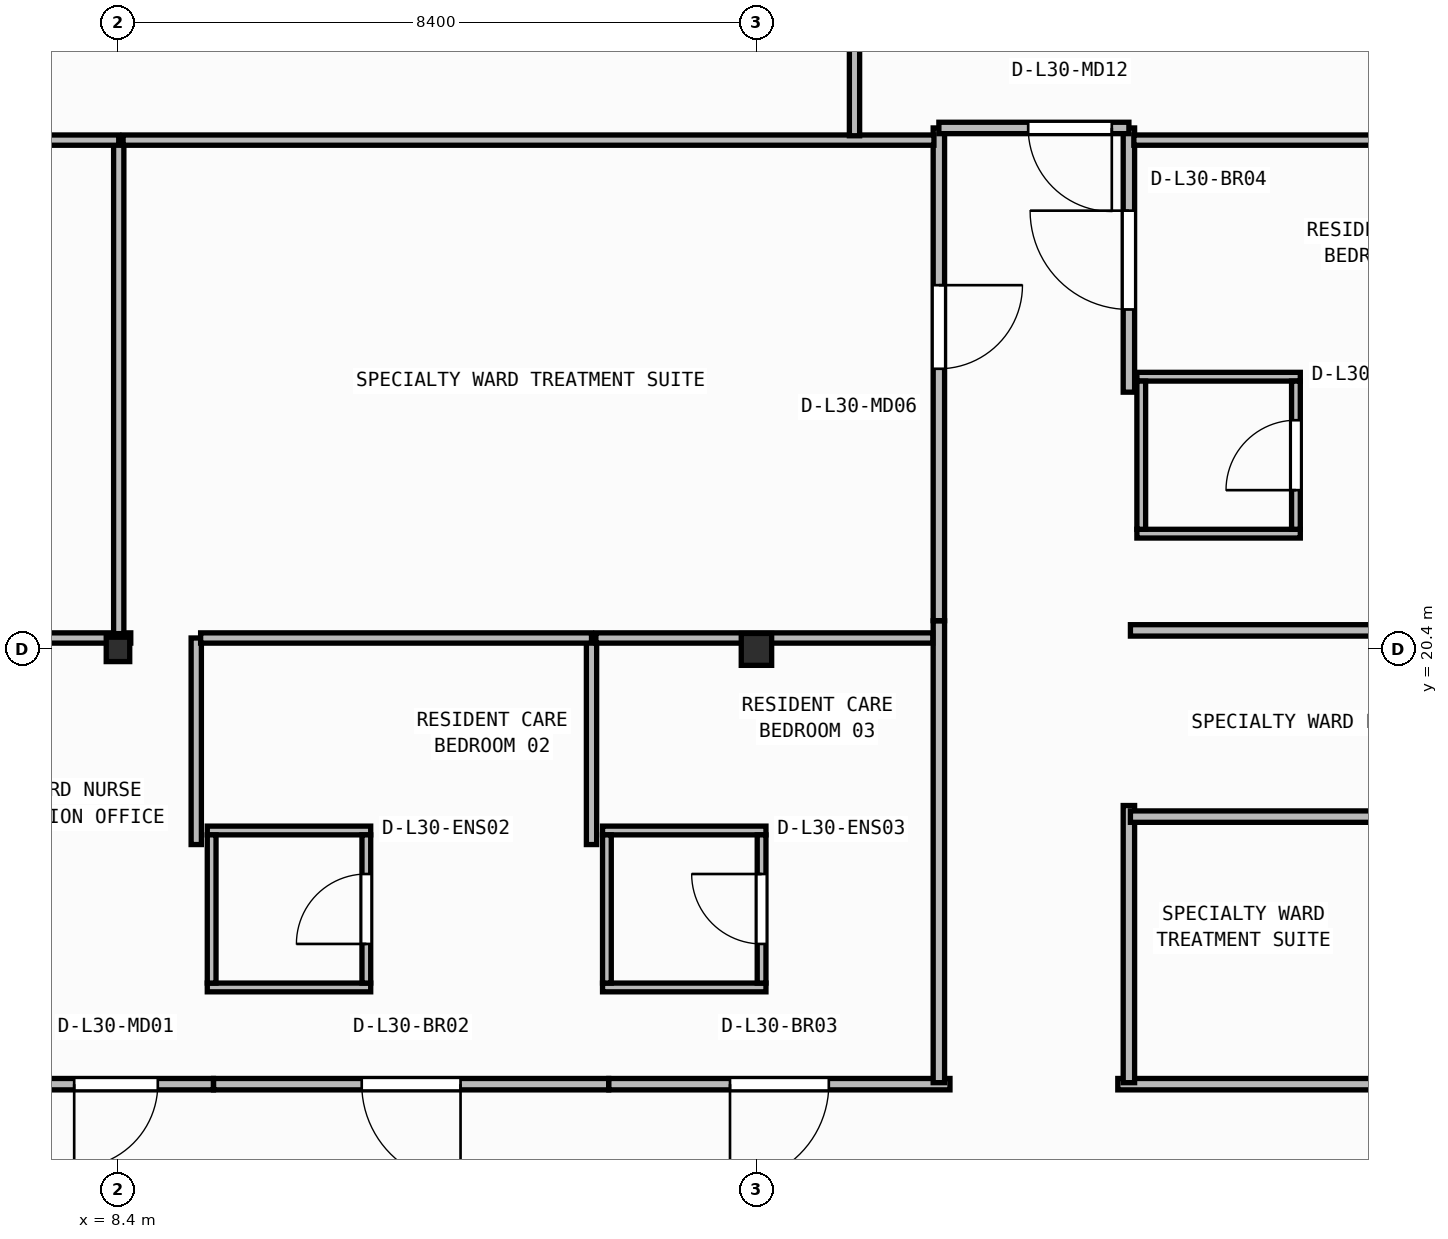
"""IFC4 building model, lengths in metres.
Left out: names, types, materials, properties, quantities, classifications, styles, units other than length and angle.
Written with IfcOpenShell. Run it as: python <this file> out.ifc"""

import sys

from ifc_helpers import new_model, si_unit, direction, frame, frame_2d, origin, origin_2d, place, context, subcontext, project, spatial, rectangle, i_section, extrude, element, fill, save


model = new_model("IFC4")
c1 = context("Model", 3, precision=1e-05, world=origin(), true_north=direction((0.0, 1.0)))
c2 = subcontext(c1, "Body", "Model", "MODEL_VIEW")
j1 = project(units=[si_unit("LENGTHUNIT", "METRE"), si_unit("PLANEANGLEUNIT", "RADIAN")], contexts=[c1])
p1 = place(None, origin())
s1 = spatial("IfcSite", under=j1, at=p1, CompositionType="ELEMENT")
p2 = place(p1, origin())
s2 = spatial("IfcBuilding", under=s1, at=p2, CompositionType="ELEMENT")
p3 = place(p2, frame((0.0, 0.0, 123.1)))
s3 = spatial("IfcBuildingStorey", under=s2, at=p3, CompositionType="ELEMENT", Elevation=123.1)
p4 = place(p3, frame((8.4, 20.4, 0.0), z_axis=(0.0, 0.0, 1.0), x_axis=(1.0, 0.0, 0.0)))
e1 = element("IfcColumn", 1, at=p4, inside=s3, PredefinedType="COLUMN", context=c2, shape_type="SweptSolid", body=[
    extrude(i_section(OverallWidth=0.309, OverallDepth=0.321, WebThickness=0.014, FlangeThickness=0.022, FilletRadius=0.017, at=origin_2d()), origin(), (0.0, 0.0, 1.0), 3.95),
])
p5 = place(p3, frame((16.8, 20.4, 0.0), z_axis=(0.0, 0.0, 1.0), x_axis=(1.0, 0.0, 0.0)))
e2 = element("IfcColumn", 2, at=p5, inside=s3, PredefinedType="COLUMN", context=c2, shape_type="SweptSolid", body=[
    extrude(i_section(OverallWidth=0.4, OverallDepth=0.42, WebThickness=0.025, FlangeThickness=0.04, at=origin_2d()), origin(), (0.0, 0.0, 1.0), 3.95),
])
for number, where, z_axis, x_axis in (
    (3, (9.575, 15.952, 0.0), (0.0, 0.0, 1.0), (1.0, 0.0, 0.0)),
    (4, (9.575, 18.018, 0.0), (0.0, 0.0, 1.0), (1.0, 0.0, 0.0)),
):
    element("IfcWall", number, at=place(p3, frame(where, z_axis=z_axis, x_axis=x_axis)), inside=s3, PredefinedType="PARTITIONING", context=c2, shape_type="SweptSolid", body=[
        extrude(rectangle(XDim=2.15, YDim=0.115, at=frame_2d((1.075, 0.0))), origin(), (0.0, 0.0, 1.0), 3.71),
    ])
p6 = place(p3, frame((9.633, 16.01, 0.0), z_axis=(0.0, 0.0, 1.0), x_axis=(0.0, 1.0, 0.0)))
e5 = element("IfcWall", 5, at=p6, inside=s3, PredefinedType="PARTITIONING", context=c2, shape_type="SweptSolid", body=[
    extrude(rectangle(XDim=1.95, YDim=0.115, at=frame_2d((0.975, 0.0))), origin(), (0.0, 0.0, 1.0), 3.71),
])
p7 = place(p3, frame((11.667, 16.01, 0.0), z_axis=(0.0, 0.0, 1.0), x_axis=(0.0, 1.0, 0.0)))
e6 = element("IfcWall", 6, at=p7, inside=s3, PredefinedType="PARTITIONING", context=c2, shape_type="SweptSolid", body=[
    extrude(rectangle(XDim=1.95, YDim=0.115, at=frame_2d((0.975, 0.0))), origin(), (0.0, 0.0, 1.0), 3.71),
])
p8 = place(p7, frame((0.515, 0.0, 0.0)))
e7 = element("IfcOpeningElement", 7, at=p8, cuts=e6, PredefinedType="OPENING", context=c2, shape_type="SweptSolid", body=[
    extrude(rectangle(XDim=0.92, YDim=2.1, at=frame_2d((0.46, 1.05))), frame((0.0, 0.067, 0.0), z_axis=(0.0, -1.0, 0.0), x_axis=(1.0, 0.0, 0.0)), (0.0, 0.0, 1.0), 0.135),
])
for number, where, z_axis, x_axis in (
    (8, (14.775, 15.952, 0.0), (0.0, 0.0, 1.0), (1.0, 0.0, 0.0)),
    (9, (14.775, 18.018, 0.0), (0.0, 0.0, 1.0), (1.0, 0.0, 0.0)),
):
    element("IfcWall", number, at=place(p3, frame(where, z_axis=z_axis, x_axis=x_axis)), inside=s3, PredefinedType="PARTITIONING", context=c2, shape_type="SweptSolid", body=[
        extrude(rectangle(XDim=2.15, YDim=0.115, at=frame_2d((1.075, 0.0))), origin(), (0.0, 0.0, 1.0), 3.71),
    ])
p9 = place(p3, frame((14.833, 16.01, 0.0), z_axis=(0.0, 0.0, 1.0), x_axis=(0.0, 1.0, 0.0)))
e10 = element("IfcWall", 10, at=p9, inside=s3, PredefinedType="PARTITIONING", context=c2, shape_type="SweptSolid", body=[
    extrude(rectangle(XDim=1.95, YDim=0.115, at=frame_2d((0.975, 0.0))), origin(), (0.0, 0.0, 1.0), 3.71),
])
p10 = place(p3, frame((16.867, 16.01, 0.0), z_axis=(0.0, 0.0, 1.0), x_axis=(0.0, 1.0, 0.0)))
e11 = element("IfcWall", 11, at=p10, inside=s3, PredefinedType="PARTITIONING", context=c2, shape_type="SweptSolid", body=[
    extrude(rectangle(XDim=1.95, YDim=0.115, at=frame_2d((0.975, 0.0))), origin(), (0.0, 0.0, 1.0), 3.71),
])
p11 = place(p10, frame((0.515, 0.0, 0.0)))
e12 = element("IfcOpeningElement", 12, at=p11, cuts=e11, PredefinedType="OPENING", context=c2, shape_type="SweptSolid", body=[
    extrude(rectangle(XDim=0.92, YDim=2.1, at=frame_2d((0.46, 1.05))), frame((0.0, 0.067, 0.0), z_axis=(0.0, -1.0, 0.0), x_axis=(1.0, 0.0, 0.0)), (0.0, 0.0, 1.0), 0.135),
])
for number, where, z_axis, x_axis in (
    (13, (21.805, 21.923, 0.0), (0.0, 0.0, 1.0), (1.0, 0.0, 0.0)),
    (14, (21.805, 23.988, 0.0), (0.0, 0.0, 1.0), (1.0, 0.0, 0.0)),
):
    element("IfcWall", number, at=place(p3, frame(where, z_axis=z_axis, x_axis=x_axis)), inside=s3, PredefinedType="PARTITIONING", context=c2, shape_type="SweptSolid", body=[
        extrude(rectangle(XDim=2.15, YDim=0.115, at=frame_2d((1.075, 0.0))), origin(), (0.0, 0.0, 1.0), 3.71),
    ])
p12 = place(p3, frame((21.863, 21.98, 0.0), z_axis=(0.0, 0.0, 1.0), x_axis=(0.0, 1.0, 0.0)))
e15 = element("IfcWall", 15, at=p12, inside=s3, PredefinedType="PARTITIONING", context=c2, shape_type="SweptSolid", body=[
    extrude(rectangle(XDim=1.95, YDim=0.115, at=frame_2d((0.975, 0.0))), origin(), (0.0, 0.0, 1.0), 3.71),
])
p13 = place(p3, frame((23.897, 21.98, 0.0), z_axis=(0.0, 0.0, 1.0), x_axis=(0.0, 1.0, 0.0)))
e16 = element("IfcWall", 16, at=p13, inside=s3, PredefinedType="PARTITIONING", context=c2, shape_type="SweptSolid", body=[
    extrude(rectangle(XDim=1.95, YDim=0.115, at=frame_2d((0.975, 0.0))), origin(), (0.0, 0.0, 1.0), 3.71),
])
p14 = place(p13, frame((0.515, 0.0, 0.0)))
e17 = element("IfcOpeningElement", 17, at=p14, cuts=e16, PredefinedType="OPENING", context=c2, shape_type="SweptSolid", body=[
    extrude(rectangle(XDim=0.92, YDim=2.1, at=frame_2d((0.46, 1.05))), frame((0.0, 0.067, 0.0), z_axis=(0.0, -1.0, 0.0), x_axis=(1.0, 0.0, 0.0)), (0.0, 0.0, 1.0), 0.135),
])
p15 = place(p3, frame((9.656, 14.68, 0.0), z_axis=(0.0, 0.0, 1.0), x_axis=(-1.0, 0.0, 0.0)))
e18 = element("IfcWall", 18, at=p15, inside=s3, PredefinedType="PARTITIONING", context=c2, shape_type="SweptSolid", body=[
    extrude(rectangle(XDim=2.564, YDim=0.15, at=frame_2d((1.282, 0.0))), origin(), (0.0, 0.0, 1.0), 3.71),
])
p16 = place(p15, frame((0.732, 0.0, 0.0)))
e19 = element("IfcOpeningElement", 19, at=p16, cuts=e18, PredefinedType="OPENING", context=c2, shape_type="SweptSolid", body=[
    extrude(rectangle(XDim=1.1, YDim=2.1, at=frame_2d((0.55, 1.05))), frame((0.0, 0.085, 0.0), z_axis=(0.0, -1.0, 0.0), x_axis=(1.0, 0.0, 0.0)), (0.0, 0.0, 1.0), 0.17),
])
p17 = place(p3, frame((14.856, 14.68, 0.0), z_axis=(0.0, 0.0, 1.0), x_axis=(-1.0, 0.0, 0.0)))
e20 = element("IfcWall", 20, at=p17, inside=s3, PredefinedType="PARTITIONING", context=c2, shape_type="SweptSolid", body=[
    extrude(rectangle(XDim=5.198, YDim=0.15, at=frame_2d((2.599, 0.0))), origin(), (0.0, 0.0, 1.0), 3.71),
])
p18 = place(p17, frame((1.949, 0.0, 0.0)))
e21 = element("IfcOpeningElement", 21, at=p18, cuts=e20, PredefinedType="OPENING", context=c2, shape_type="SweptSolid", body=[
    extrude(rectangle(XDim=1.3, YDim=2.15, at=frame_2d((0.65, 1.075))), frame((0.0, 0.085, 0.0), z_axis=(0.0, -1.0, 0.0), x_axis=(1.0, 0.0, 0.0)), (0.0, 0.0, 1.0), 0.17),
])
p19 = place(p3, frame((19.346, 14.68, 0.0), z_axis=(0.0, 0.0, 1.0), x_axis=(-1.0, 0.0, 0.0)))
e22 = element("IfcWall", 22, at=p19, inside=s3, PredefinedType="PARTITIONING", context=c2, shape_type="SweptSolid", body=[
    extrude(rectangle(XDim=4.488, YDim=0.15, at=frame_2d((2.244, 0.0))), origin(), (0.0, 0.0, 1.0), 3.71),
])
p20 = place(p19, frame((1.594, 0.0, 0.0)))
e23 = element("IfcOpeningElement", 23, at=p20, cuts=e22, PredefinedType="OPENING", context=c2, shape_type="SweptSolid", body=[
    extrude(rectangle(XDim=1.3, YDim=2.15, at=frame_2d((0.65, 1.075))), frame((0.0, 0.085, 0.0), z_axis=(0.0, -1.0, 0.0), x_axis=(1.0, 0.0, 0.0)), (0.0, 0.0, 1.0), 0.17),
])
p21 = place(p3, frame((29.806, 14.68, 0.0), z_axis=(0.0, 0.0, 1.0), x_axis=(-1.0, 0.0, 0.0)))
e24 = element("IfcWall", 24, at=p21, inside=s3, PredefinedType="PARTITIONING", context=c2, shape_type="SweptSolid", body=[
    extrude(rectangle(XDim=8.252, YDim=0.15, at=frame_2d((4.126, 0.0))), origin(), (0.0, 0.0, 1.0), 3.71),
])
p22 = place(p21, frame((3.576, 0.0, 0.0)))
e25 = element("IfcOpeningElement", 25, at=p22, cuts=e24, PredefinedType="OPENING", context=c2, shape_type="SweptSolid", body=[
    extrude(rectangle(XDim=1.1, YDim=2.1, at=frame_2d((0.55, 1.05))), frame((0.0, 0.085, 0.0), z_axis=(0.0, -1.0, 0.0), x_axis=(1.0, 0.0, 0.0)), (0.0, 0.0, 1.0), 0.17),
])
p23 = place(p3, frame((19.2, 20.776, 0.0), z_axis=(0.0, 0.0, 1.0), x_axis=(0.0, -1.0, 0.0)))
e26 = element("IfcWall", 26, at=p23, inside=s3, PredefinedType="PARTITIONING", context=c2, shape_type="SweptSolid", body=[
    extrude(rectangle(XDim=6.076, YDim=0.15, at=frame_2d((3.038, 0.0))), origin(), (0.0, 0.0, 1.0), 3.71),
])
p24 = place(p3, frame((21.7, 14.7, 0.0), z_axis=(0.0, 0.0, 1.0), x_axis=(0.0, 1.0, 0.0)))
e27 = element("IfcWall", 27, at=p24, inside=s3, PredefinedType="PARTITIONING", context=c2, shape_type="SweptSolid", body=[
    extrude(rectangle(XDim=3.646, YDim=0.15, at=frame_2d((1.823, 0.0))), origin(), (0.0, 0.0, 1.0), 3.71),
])
p25 = place(p3, frame((19.2, 27.26, 0.0), z_axis=(0.0, 0.0, 1.0), x_axis=(0.0, -1.0, 0.0)))
e28 = element("IfcWall", 28, at=p25, inside=s3, PredefinedType="PARTITIONING", context=c2, shape_type="SweptSolid", body=[
    extrude(rectangle(XDim=6.482, YDim=0.15, at=frame_2d((3.241, 0.0))), origin(), (0.0, 0.0, 1.0), 3.71),
])
p26 = place(p25, frame((2.068, 0.0, 0.0)))
e29 = element("IfcOpeningElement", 29, at=p26, cuts=e28, PredefinedType="OPENING", context=c2, shape_type="SweptSolid", body=[
    extrude(rectangle(XDim=1.1, YDim=2.1, at=frame_2d((0.55, 1.05))), frame((0.0, 0.085, 0.0), z_axis=(0.0, -1.0, 0.0), x_axis=(1.0, 0.0, 0.0)), (0.0, 0.0, 1.0), 0.17),
])
p27 = place(p3, frame((21.7, 23.784, 0.0), z_axis=(0.0, 0.0, 1.0), x_axis=(0.0, 1.0, 0.0)))
e30 = element("IfcWall", 30, at=p27, inside=s3, PredefinedType="PARTITIONING", context=c2, shape_type="SweptSolid", body=[
    extrude(rectangle(XDim=3.476, YDim=0.15, at=frame_2d((1.738, 0.0))), origin(), (0.0, 0.0, 1.0), 3.71),
])
p28 = place(p27, frame((1.088, 0.0, 0.0)))
e31 = element("IfcOpeningElement", 31, at=p28, cuts=e30, PredefinedType="OPENING", context=c2, shape_type="SweptSolid", body=[
    extrude(rectangle(XDim=1.3, YDim=2.15, at=frame_2d((0.65, 1.075))), frame((0.0, 0.085, 0.0), z_axis=(0.0, -1.0, 0.0), x_axis=(1.0, 0.0, 0.0)), (0.0, 0.0, 1.0), 0.17),
])
p29 = place(p3, frame((21.7, 27.26, 0.0), z_axis=(0.0, 0.0, 1.0), x_axis=(-1.0, 0.0, 0.0)))
e32 = element("IfcWall", 32, at=p29, inside=s3, PredefinedType="PARTITIONING", context=c2, shape_type="SweptSolid", body=[
    extrude(rectangle(XDim=2.5, YDim=0.15, at=frame_2d((1.25, 0.0))), origin(), (0.0, 0.0, 1.0), 3.71),
])
p30 = place(p29, frame((0.225, 0.0, 0.0)))
e33 = element("IfcOpeningElement", 33, at=p30, cuts=e32, PredefinedType="OPENING", context=c2, shape_type="SweptSolid", body=[
    extrude(rectangle(XDim=1.1, YDim=2.1, at=frame_2d((0.55, 1.05))), frame((0.0, 0.085, 0.0), z_axis=(0.0, -1.0, 0.0), x_axis=(1.0, 0.0, 0.0)), (0.0, 0.0, 1.0), 0.17),
])
p31 = place(p3, frame((21.72, 18.2, 0.0), z_axis=(0.0, 0.0, 1.0), x_axis=(1.0, 0.0, 0.0)))
e34 = element("IfcWall", 34, at=p31, inside=s3, PredefinedType="PARTITIONING", context=c2, shape_type="SweptSolid", body=[
    extrude(rectangle(XDim=8.086, YDim=0.15, at=frame_2d((4.043, 0.0))), origin(), (0.0, 0.0, 1.0), 3.71),
])
p32 = place(p3, frame((26.566, 20.65, 0.0), z_axis=(0.0, 0.0, 1.0), x_axis=(-1.0, 0.0, 0.0)))
e35 = element("IfcWall", 35, at=p32, inside=s3, PredefinedType="PARTITIONING", context=c2, shape_type="SweptSolid", body=[
    extrude(rectangle(XDim=4.846, YDim=0.15, at=frame_2d((2.423, 0.0))), origin(), (0.0, 0.0, 1.0), 3.083),
])
p33 = place(p3, frame((9.43, 17.833, 0.0), z_axis=(0.0, 0.0, 1.0), x_axis=(0.0, 1.0, 0.0)))
e36 = element("IfcWall", 36, at=p33, inside=s3, PredefinedType="PARTITIONING", context=c2, shape_type="SweptSolid", body=[
    extrude(rectangle(XDim=2.718, YDim=0.135, at=frame_2d((1.359, 0.0))), origin(), (0.0, 0.0, 1.0), 3.71),
])
p34 = place(p3, frame((8.568, 20.55, 0.0), z_axis=(0.0, 0.0, 1.0), x_axis=(-1.0, 0.0, 0.0)))
e37 = element("IfcWall", 37, at=p34, inside=s3, PredefinedType="PARTITIONING", context=c2, shape_type="SweptSolid", body=[
    extrude(rectangle(XDim=3.901, YDim=0.135, at=frame_2d((1.95, 0.0))), origin(), (0.0, 0.0, 1.0), 3.083),
])
p35 = place(p34, frame((2.541, 0.0, 0.0)))
e38 = element("IfcOpeningElement", 38, at=p35, cuts=e37, PredefinedType="OPENING", context=c2, shape_type="SweptSolid", body=[
    extrude(rectangle(XDim=1.1, YDim=2.1, at=frame_2d((0.55, 1.05))), frame((0.0, 0.077, 0.0), z_axis=(0.0, -1.0, 0.0), x_axis=(1.0, 0.0, 0.0)), (0.0, 0.0, 1.0), 0.155),
])
p36 = place(p3, frame((14.63, 17.833, 0.0), z_axis=(0.0, 0.0, 1.0), x_axis=(0.0, 1.0, 0.0)))
e39 = element("IfcWall", 39, at=p36, inside=s3, PredefinedType="PARTITIONING", context=c2, shape_type="SweptSolid", body=[
    extrude(rectangle(XDim=2.718, YDim=0.135, at=frame_2d((1.359, 0.0))), origin(), (0.0, 0.0, 1.0), 3.71),
])
p37 = place(p3, frame((14.63, 20.55, 0.0), z_axis=(0.0, 0.0, 1.0), x_axis=(-1.0, 0.0, 0.0)))
e40 = element("IfcWall", 40, at=p37, inside=s3, PredefinedType="PARTITIONING", context=c2, shape_type="SweptSolid", body=[
    extrude(rectangle(XDim=5.142, YDim=0.135, at=frame_2d((2.571, 0.0))), origin(), (0.0, 0.0, 1.0), 3.083),
])
p38 = place(p3, frame((19.12, 20.55, 0.0), z_axis=(0.0, 0.0, 1.0), x_axis=(-1.0, 0.0, 0.0)))
e41 = element("IfcWall", 41, at=p38, inside=s3, PredefinedType="PARTITIONING", context=c2, shape_type="SweptSolid", body=[
    extrude(rectangle(XDim=4.433, YDim=0.135, at=frame_2d((2.216, 0.0))), origin(), (0.0, 0.0, 1.0), 3.083),
])
p39 = place(p3, frame((8.41, 20.607, 0.0), z_axis=(0.0, 0.0, 1.0), x_axis=(0.0, 1.0, 0.0)))
e42 = element("IfcWall", 42, at=p39, inside=s3, PredefinedType="PARTITIONING", context=c2, shape_type="SweptSolid", body=[
    extrude(rectangle(XDim=6.493, YDim=0.135, at=frame_2d((3.246, 0.0))), origin(), (0.0, 0.0, 1.0), 3.152),
])
p40 = place(p3, frame((8.41, 27.1, 0.0), z_axis=(0.0, 0.0, 1.0), x_axis=(-1.0, 0.0, 0.0)))
e43 = element("IfcWall", 43, at=p40, inside=s3, PredefinedType="PARTITIONING", context=c2, shape_type="SweptSolid", body=[
    extrude(rectangle(XDim=8.17, YDim=0.135, at=frame_2d((4.085, 0.0))), origin(), (0.0, 0.0, 1.0), 3.71),
])
p41 = place(p40, frame((3.035, 0.0, 0.0)))
e44 = element("IfcOpeningElement", 44, at=p41, cuts=e43, PredefinedType="OPENING", context=c2, shape_type="SweptSolid", body=[
    extrude(rectangle(XDim=1.1, YDim=2.1, at=frame_2d((0.55, 1.05))), frame((0.0, 0.077, 0.0), z_axis=(0.0, -1.0, 0.0), x_axis=(1.0, 0.0, 0.0)), (0.0, 0.0, 1.0), 0.155),
])
p42 = place(p3, frame((19.135, 27.1, 0.0), z_axis=(0.0, 0.0, 1.0), x_axis=(-1.0, 0.0, 0.0)))
e45 = element("IfcWall", 45, at=p42, inside=s3, PredefinedType="PARTITIONING", context=c2, shape_type="SweptSolid", body=[
    extrude(rectangle(XDim=10.667, YDim=0.135, at=frame_2d((5.334, 0.0))), origin(), (0.0, 0.0, 1.0), 3.71),
])
p43 = place(p3, frame((26.34, 27.1, 0.0), z_axis=(0.0, 0.0, 1.0), x_axis=(-1.0, 0.0, 0.0)))
e46 = element("IfcWall", 46, at=p43, inside=s3, PredefinedType="PARTITIONING", context=c2, shape_type="SweptSolid", body=[
    extrude(rectangle(XDim=4.575, YDim=0.135, at=frame_2d((2.288, 0.0))), origin(), (0.0, 0.0, 1.0), 3.71),
])
p44 = place(p3, frame((18.09, 27.157, 0.0), z_axis=(0.0, 0.0, 1.0), x_axis=(0.0, 1.0, 0.0)))
e47 = element("IfcWall", 47, at=p44, inside=s3, PredefinedType="PARTITIONING", context=c2, shape_type="SweptSolid", body=[
    extrude(rectangle(XDim=7.181, YDim=0.135, at=frame_2d((3.59, 0.0))), origin(), (0.0, 0.0, 1.0), 3.71),
])
p45 = place(p8, origin())
e48 = element("IfcDoor", 48, at=p45, inside=s3, OperationType="SINGLE_SWING_LEFT", PredefinedType="DOOR", context=c2, shape_type="SweptSolid", body=[
    extrude(rectangle(XDim=0.92, YDim=2.1, at=frame_2d((0.46, 1.05))), frame((0.0, 0.025, 0.0), z_axis=(0.0, -1.0, 0.0), x_axis=(1.0, 0.0, 0.0)), (0.0, 0.0, 1.0), 0.05),
])
fill(e7, e48)
p46 = place(p11, origin())
e49 = element("IfcDoor", 49, at=p46, inside=s3, OperationType="SINGLE_SWING_RIGHT", PredefinedType="DOOR", context=c2, shape_type="SweptSolid", body=[
    extrude(rectangle(XDim=0.92, YDim=2.1, at=frame_2d((0.46, 1.05))), frame((0.0, 0.025, 0.0), z_axis=(0.0, -1.0, 0.0), x_axis=(1.0, 0.0, 0.0)), (0.0, 0.0, 1.0), 0.05),
])
fill(e12, e49)
p47 = place(p14, origin())
e50 = element("IfcDoor", 50, at=p47, inside=s3, OperationType="SINGLE_SWING_LEFT", PredefinedType="DOOR", context=c2, shape_type="SweptSolid", body=[
    extrude(rectangle(XDim=0.92, YDim=2.1, at=frame_2d((0.46, 1.05))), frame((0.0, 0.025, 0.0), z_axis=(0.0, -1.0, 0.0), x_axis=(1.0, 0.0, 0.0)), (0.0, 0.0, 1.0), 0.05),
])
fill(e17, e50)
p48 = place(p16, origin())
e51 = element("IfcDoor", 51, at=p48, inside=s3, OperationType="SINGLE_SWING_RIGHT", PredefinedType="DOOR", context=c2, shape_type="SweptSolid", body=[
    extrude(rectangle(XDim=1.1, YDim=2.1, at=frame_2d((0.55, 1.05))), frame((0.0, 0.025, 0.0), z_axis=(0.0, -1.0, 0.0), x_axis=(1.0, 0.0, 0.0)), (0.0, 0.0, 1.0), 0.05),
])
fill(e19, e51)
p49 = place(p18, origin())
e52 = element("IfcDoor", 52, at=p49, inside=s3, OperationType="SINGLE_SWING_LEFT", PredefinedType="DOOR", context=c2, shape_type="SweptSolid", body=[
    extrude(rectangle(XDim=1.3, YDim=2.15, at=frame_2d((0.65, 1.075))), frame((0.0, 0.025, 0.0), z_axis=(0.0, -1.0, 0.0), x_axis=(1.0, 0.0, 0.0)), (0.0, 0.0, 1.0), 0.05),
])
fill(e21, e52)
p50 = place(p20, origin())
e53 = element("IfcDoor", 53, at=p50, inside=s3, OperationType="SINGLE_SWING_RIGHT", PredefinedType="DOOR", context=c2, shape_type="SweptSolid", body=[
    extrude(rectangle(XDim=1.3, YDim=2.15, at=frame_2d((0.65, 1.075))), frame((0.0, 0.025, 0.0), z_axis=(0.0, -1.0, 0.0), x_axis=(1.0, 0.0, 0.0)), (0.0, 0.0, 1.0), 0.05),
])
fill(e23, e53)
p51 = place(p26, origin())
e54 = element("IfcDoor", 54, at=p51, inside=s3, OperationType="SINGLE_SWING_LEFT", PredefinedType="DOOR", context=c2, shape_type="SweptSolid", body=[
    extrude(rectangle(XDim=1.1, YDim=2.1, at=frame_2d((0.55, 1.05))), frame((0.0, 0.025, 0.0), z_axis=(0.0, -1.0, 0.0), x_axis=(1.0, 0.0, 0.0)), (0.0, 0.0, 1.0), 0.05),
])
fill(e29, e54)
p52 = place(p28, origin())
e55 = element("IfcDoor", 55, at=p52, inside=s3, OperationType="SINGLE_SWING_RIGHT", PredefinedType="DOOR", context=c2, shape_type="SweptSolid", body=[
    extrude(rectangle(XDim=1.3, YDim=2.15, at=frame_2d((0.65, 1.075))), frame((0.0, 0.025, 0.0), z_axis=(0.0, -1.0, 0.0), x_axis=(1.0, 0.0, 0.0)), (0.0, 0.0, 1.0), 0.05),
])
fill(e31, e55)
p53 = place(p30, origin())
e56 = element("IfcDoor", 56, at=p53, inside=s3, OperationType="SINGLE_SWING_LEFT", PredefinedType="DOOR", context=c2, shape_type="SweptSolid", body=[
    extrude(rectangle(XDim=1.1, YDim=2.1, at=frame_2d((0.55, 1.05))), frame((0.0, 0.025, 0.0), z_axis=(0.0, -1.0, 0.0), x_axis=(1.0, 0.0, 0.0)), (0.0, 0.0, 1.0), 0.05),
])
fill(e33, e56)
save(model, sys.argv[1])
